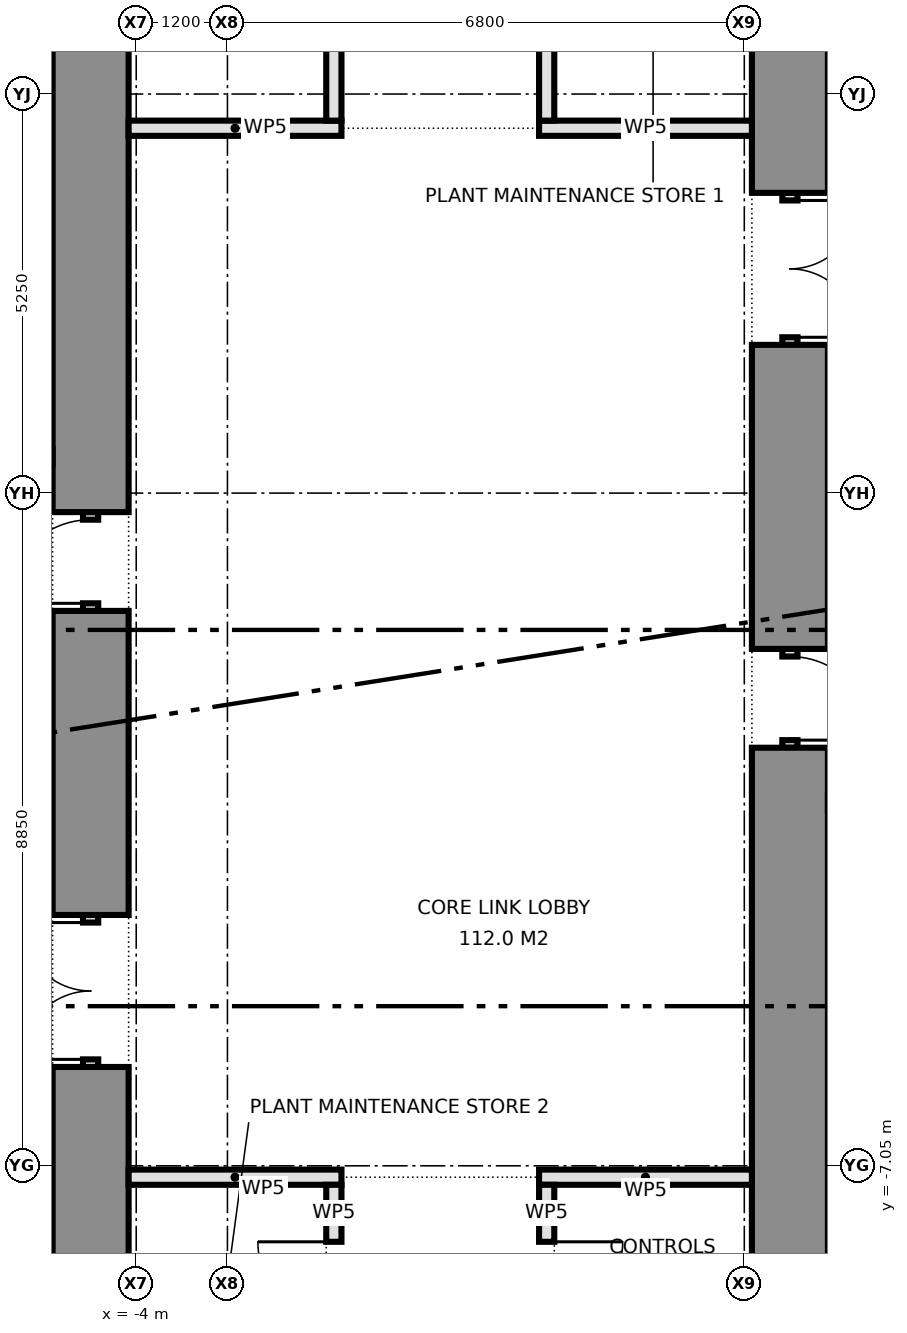
"""IFC4 building model, lengths in metres.
Left out: names, types, materials, properties, quantities, classifications, styles, units other than length and angle.
Written with IfcOpenShell. Run it as: python <this file> out.ifc"""

import sys

from ifc_helpers import new_model, si_unit, direction, frame, frame_2d, origin, place, context, subcontext, project, spatial, rectangle, extrude, element, fill, save


model = new_model("IFC4")
c1 = context("Model", 3, precision=1e-05, world=origin(), true_north=direction((0.0, 1.0)))
c2 = subcontext(c1, "Body", "Model", "MODEL_VIEW")
j1 = project(units=[si_unit("LENGTHUNIT", "METRE"), si_unit("PLANEANGLEUNIT", "RADIAN")], contexts=[c1])
p1 = place(None, origin())
s1 = spatial("IfcSite", under=j1, at=p1, CompositionType="ELEMENT")
p2 = place(p1, origin())
s2 = spatial("IfcBuilding", under=s1, at=p2, CompositionType="ELEMENT")
p3 = place(p2, frame((0.0, 0.0, 120.4)))
s3 = spatial("IfcBuildingStorey", under=s2, at=p3, CompositionType="ELEMENT", Elevation=120.4)
p4 = place(p3, frame((-4.6, -8.9, 0.0), z_axis=(0.0, 0.0, 1.0), x_axis=(0.0, 1.0, 0.0)))
e1 = element("IfcWall", 1, at=p4, inside=s3, PredefinedType="SHEAR", context=c2, shape_type="SweptSolid", body=[
    extrude(rectangle(XDim=3.15, YDim=1.0, at=frame_2d((1.575, 0.0))), origin(), (0.0, 0.0, 1.0), 4.34),
])
p5 = place(p3, frame((-4.6, -5.75, 0.0), z_axis=(0.0, 0.0, 1.0), x_axis=(0.0, 1.0, 0.0)))
e2 = element("IfcWall", 2, at=p5, inside=s3, PredefinedType="PARTITIONING", context=c2, shape_type="SweptSolid", body=[
    extrude(rectangle(XDim=2.0, YDim=0.2, at=frame_2d((1.0, 0.0))), origin(), (0.0, 0.0, 1.0), 2.4),
])
p6 = place(p5, frame((0.1, 0.0, 0.0)))
e3 = element("IfcOpeningElement", 3, at=p6, cuts=e2, PredefinedType="OPENING", context=c2, shape_type="SweptSolid", body=[
    extrude(rectangle(XDim=1.8, YDim=2.1, at=frame_2d((0.9, 1.05))), frame((0.0, 0.11, 0.0), z_axis=(0.0, -1.0, 0.0), x_axis=(1.0, 0.0, 0.0)), (0.0, 0.0, 1.0), 0.22),
])
p7 = place(p3, frame((-4.6, -3.75, 0.0), z_axis=(0.0, 0.0, 1.0), x_axis=(0.0, 1.0, 0.0)))
e4 = element("IfcWall", 4, at=p7, inside=s3, PredefinedType="SHEAR", context=c2, shape_type="SweptSolid", body=[
    extrude(rectangle(XDim=4.0, YDim=1.0, at=frame_2d((2.0, 0.0))), origin(), (0.0, 0.0, 1.0), 4.34),
])
p8 = place(p3, frame((-4.6, 0.25, 0.0), z_axis=(0.0, 0.0, 1.0), x_axis=(0.0, 1.0, 0.0)))
e5 = element("IfcWall", 5, at=p8, inside=s3, PredefinedType="PARTITIONING", context=c2, shape_type="SweptSolid", body=[
    extrude(rectangle(XDim=1.3, YDim=0.2, at=frame_2d((0.65, 0.0))), origin(), (0.0, 0.0, 1.0), 2.4),
])
p9 = place(p8, frame((0.1, 0.0, 0.0)))
e6 = element("IfcOpeningElement", 6, at=p9, cuts=e5, PredefinedType="OPENING", context=c2, shape_type="SweptSolid", body=[
    extrude(rectangle(XDim=1.1, YDim=2.1, at=frame_2d((0.55, 1.05))), frame((0.0, 0.11, 0.0), z_axis=(0.0, -1.0, 0.0), x_axis=(1.0, 0.0, 0.0)), (0.0, 0.0, 1.0), 0.22),
])
p10 = place(p3, frame((-4.6, 1.55, 0.0), z_axis=(0.0, 0.0, 1.0), x_axis=(0.0, 1.0, 0.0)))
e7 = element("IfcWall", 7, at=p10, inside=s3, PredefinedType="SHEAR", context=c2, shape_type="SweptSolid", body=[
    extrude(rectangle(XDim=7.35, YDim=1.0, at=frame_2d((3.675, 0.0))), origin(), (0.0, 0.0, 1.0), 4.34),
])
p11 = place(p3, frame((4.6, 8.9, 0.0), z_axis=(0.0, 0.0, 1.0), x_axis=(0.0, -1.0, 0.0)))
e8 = element("IfcWall", 8, at=p11, inside=s3, PredefinedType="SHEAR", context=c2, shape_type="SweptSolid", body=[
    extrude(rectangle(XDim=3.15, YDim=1.0, at=frame_2d((1.575, 0.0))), origin(), (0.0, 0.0, 1.0), 4.34),
])
p12 = place(p3, frame((4.6, 5.75, 0.0), z_axis=(0.0, 0.0, 1.0), x_axis=(0.0, -1.0, 0.0)))
e9 = element("IfcWall", 9, at=p12, inside=s3, PredefinedType="PARTITIONING", context=c2, shape_type="SweptSolid", body=[
    extrude(rectangle(XDim=2.0, YDim=0.2, at=frame_2d((1.0, 0.0))), origin(), (0.0, 0.0, 1.0), 2.4),
])
p13 = place(p12, frame((0.1, 0.0, 0.0)))
e10 = element("IfcOpeningElement", 10, at=p13, cuts=e9, PredefinedType="OPENING", context=c2, shape_type="SweptSolid", body=[
    extrude(rectangle(XDim=1.8, YDim=2.1, at=frame_2d((0.9, 1.05))), frame((0.0, 0.11, 0.0), z_axis=(0.0, -1.0, 0.0), x_axis=(1.0, 0.0, 0.0)), (0.0, 0.0, 1.0), 0.22),
])
p14 = place(p3, frame((4.6, 3.75, 0.0), z_axis=(0.0, 0.0, 1.0), x_axis=(0.0, -1.0, 0.0)))
e11 = element("IfcWall", 11, at=p14, inside=s3, PredefinedType="SHEAR", context=c2, shape_type="SweptSolid", body=[
    extrude(rectangle(XDim=4.0, YDim=1.0, at=frame_2d((2.0, 0.0))), origin(), (0.0, 0.0, 1.0), 4.34),
])
p15 = place(p3, frame((4.6, -0.25, 0.0), z_axis=(0.0, 0.0, 1.0), x_axis=(0.0, -1.0, 0.0)))
e12 = element("IfcWall", 12, at=p15, inside=s3, PredefinedType="PARTITIONING", context=c2, shape_type="SweptSolid", body=[
    extrude(rectangle(XDim=1.3, YDim=0.2, at=frame_2d((0.65, 0.0))), origin(), (0.0, 0.0, 1.0), 2.4),
])
p16 = place(p15, frame((0.1, 0.0, 0.0)))
e13 = element("IfcOpeningElement", 13, at=p16, cuts=e12, PredefinedType="OPENING", context=c2, shape_type="SweptSolid", body=[
    extrude(rectangle(XDim=1.1, YDim=2.1, at=frame_2d((0.55, 1.05))), frame((0.0, 0.11, 0.0), z_axis=(0.0, -1.0, 0.0), x_axis=(1.0, 0.0, 0.0)), (0.0, 0.0, 1.0), 0.22),
])
p17 = place(p3, frame((4.6, -1.55, 0.0), z_axis=(0.0, 0.0, 1.0), x_axis=(0.0, -1.0, 0.0)))
e14 = element("IfcWall", 14, at=p17, inside=s3, PredefinedType="SHEAR", context=c2, shape_type="SweptSolid", body=[
    extrude(rectangle(XDim=7.35, YDim=1.0, at=frame_2d((3.675, 0.0))), origin(), (0.0, 0.0, 1.0), 4.34),
])
for number, where, z_axis, x_axis in (
    (15, (-4.1, -7.2, 0.0), (0.0, 0.0, 1.0), (1.0, 0.0, 0.0)),
    (16, (1.3, -7.2, 0.0), (0.0, 0.0, 1.0), (1.0, 0.0, 0.0)),
    (17, (-4.1, 6.6, 0.0), (0.0, 0.0, 1.0), (1.0, 0.0, 0.0)),
    (18, (1.3, 6.6, 0.0), (0.0, 0.0, 1.0), (1.0, 0.0, 0.0)),
):
    element("IfcWall", number, at=place(p3, frame(where, z_axis=z_axis, x_axis=x_axis)), inside=s3, PredefinedType="PARTITIONING", context=c2, shape_type="SweptSolid", body=[
        extrude(rectangle(XDim=2.8, YDim=0.2, at=frame_2d((1.4, 0.0))), origin(), (0.0, 0.0, 1.0), 4.34),
    ])
p18 = place(p3, frame((1.4, -9.8, 0.0), z_axis=(0.0, 0.0, 1.0), x_axis=(0.0, 1.0, 0.0)))
e19 = element("IfcWall", 19, at=p18, inside=s3, PredefinedType="PARTITIONING", context=c2, shape_type="SweptSolid", body=[
    extrude(rectangle(XDim=2.5, YDim=0.2, at=frame_2d((1.25, 0.0))), origin(), (0.0, 0.0, 1.0), 4.34),
])
p19 = place(p18, frame((0.75, 0.0, 0.0)))
e20 = element("IfcOpeningElement", 20, at=p19, cuts=e19, PredefinedType="OPENING", context=c2, shape_type="SweptSolid", body=[
    extrude(rectangle(XDim=1.0, YDim=2.1, at=frame_2d((0.5, 1.05))), frame((0.0, 0.11, 0.0), z_axis=(0.0, -1.0, 0.0), x_axis=(1.0, 0.0, 0.0)), (0.0, 0.0, 1.0), 0.22),
])
p20 = place(p3, frame((1.4, 6.7, 0.0), z_axis=(0.0, 0.0, 1.0), x_axis=(0.0, 1.0, 0.0)))
e21 = element("IfcWall", 21, at=p20, inside=s3, PredefinedType="PARTITIONING", context=c2, shape_type="SweptSolid", body=[
    extrude(rectangle(XDim=3.1, YDim=0.2, at=frame_2d((1.55, 0.0))), origin(), (0.0, 0.0, 1.0), 4.34),
])
p21 = place(p20, frame((1.05, 0.0, 0.0)))
e22 = element("IfcOpeningElement", 22, at=p21, cuts=e21, PredefinedType="OPENING", context=c2, shape_type="SweptSolid", body=[
    extrude(rectangle(XDim=1.0, YDim=2.1, at=frame_2d((0.5, 1.05))), frame((0.0, 0.11, 0.0), z_axis=(0.0, -1.0, 0.0), x_axis=(1.0, 0.0, 0.0)), (0.0, 0.0, 1.0), 0.22),
])
p22 = place(p3, frame((-1.4, -9.8, 0.0), z_axis=(0.0, 0.0, 1.0), x_axis=(0.0, 1.0, 0.0)))
e23 = element("IfcWall", 23, at=p22, inside=s3, PredefinedType="PARTITIONING", context=c2, shape_type="SweptSolid", body=[
    extrude(rectangle(XDim=2.5, YDim=0.2, at=frame_2d((1.25, 0.0))), origin(), (0.0, 0.0, 1.0), 4.34),
])
p23 = place(p22, frame((0.75, 0.0, 0.0)))
e24 = element("IfcOpeningElement", 24, at=p23, cuts=e23, PredefinedType="OPENING", context=c2, shape_type="SweptSolid", body=[
    extrude(rectangle(XDim=1.0, YDim=2.1, at=frame_2d((0.5, 1.05))), frame((0.0, 0.11, 0.0), z_axis=(0.0, -1.0, 0.0), x_axis=(1.0, 0.0, 0.0)), (0.0, 0.0, 1.0), 0.22),
])
p24 = place(p3, frame((-1.4, 6.7, 0.0), z_axis=(0.0, 0.0, 1.0), x_axis=(0.0, 1.0, 0.0)))
e25 = element("IfcWall", 25, at=p24, inside=s3, PredefinedType="PARTITIONING", context=c2, shape_type="SweptSolid", body=[
    extrude(rectangle(XDim=3.1, YDim=0.2, at=frame_2d((1.55, 0.0))), origin(), (0.0, 0.0, 1.0), 4.34),
])
p25 = place(p24, frame((1.05, 0.0, 0.0)))
e26 = element("IfcOpeningElement", 26, at=p25, cuts=e25, PredefinedType="OPENING", context=c2, shape_type="SweptSolid", body=[
    extrude(rectangle(XDim=1.0, YDim=2.1, at=frame_2d((0.5, 1.05))), frame((0.0, 0.11, 0.0), z_axis=(0.0, -1.0, 0.0), x_axis=(1.0, 0.0, 0.0)), (0.0, 0.0, 1.0), 0.22),
])
p26 = place(p6, origin())
e27 = element("IfcDoor", 27, at=p26, inside=s3, OperationType="DOUBLE_DOOR_SINGLE_SWING", PredefinedType="DOOR", context=c2, shape_type="SweptSolid", body=[
    extrude(rectangle(XDim=1.8, YDim=2.1, at=frame_2d((0.9, 1.05))), frame((0.0, 0.025, 0.0), z_axis=(0.0, -1.0, 0.0), x_axis=(1.0, 0.0, 0.0)), (0.0, 0.0, 1.0), 0.05),
])
fill(e3, e27)
p27 = place(p9, origin())
e28 = element("IfcDoor", 28, at=p27, inside=s3, OperationType="SINGLE_SWING_LEFT", PredefinedType="DOOR", context=c2, shape_type="SweptSolid", body=[
    extrude(rectangle(XDim=1.1, YDim=2.1, at=frame_2d((0.55, 1.05))), frame((0.0, 0.025, 0.0), z_axis=(0.0, -1.0, 0.0), x_axis=(1.0, 0.0, 0.0)), (0.0, 0.0, 1.0), 0.05),
])
fill(e6, e28)
p28 = place(p13, origin())
e29 = element("IfcDoor", 29, at=p28, inside=s3, OperationType="DOUBLE_DOOR_SINGLE_SWING", PredefinedType="DOOR", context=c2, shape_type="SweptSolid", body=[
    extrude(rectangle(XDim=1.8, YDim=2.1, at=frame_2d((0.9, 1.05))), frame((0.0, 0.025, 0.0), z_axis=(0.0, -1.0, 0.0), x_axis=(1.0, 0.0, 0.0)), (0.0, 0.0, 1.0), 0.05),
])
fill(e10, e29)
p29 = place(p16, origin())
e30 = element("IfcDoor", 30, at=p29, inside=s3, OperationType="SINGLE_SWING_RIGHT", PredefinedType="DOOR", context=c2, shape_type="SweptSolid", body=[
    extrude(rectangle(XDim=1.1, YDim=2.1, at=frame_2d((0.55, 1.05))), frame((0.0, 0.025, 0.0), z_axis=(0.0, -1.0, 0.0), x_axis=(1.0, 0.0, 0.0)), (0.0, 0.0, 1.0), 0.05),
])
fill(e13, e30)
p30 = place(p23, origin())
e31 = element("IfcDoor", 31, at=p30, inside=s3, OperationType="SINGLE_SWING_RIGHT", PredefinedType="DOOR", context=c2, shape_type="SweptSolid", body=[
    extrude(rectangle(XDim=1.0, YDim=2.1, at=frame_2d((0.5, 1.05))), frame((0.0, 0.025, 0.0), z_axis=(0.0, -1.0, 0.0), x_axis=(1.0, 0.0, 0.0)), (0.0, 0.0, 1.0), 0.05),
])
fill(e24, e31)
p31 = place(p19, frame((1.0, 0.0, 0.0), z_axis=(0.0, 0.0, 1.0), x_axis=(-1.0, 0.0, 0.0)))
e32 = element("IfcDoor", 32, at=p31, inside=s3, OperationType="SINGLE_SWING_LEFT", PredefinedType="DOOR", context=c2, shape_type="SweptSolid", body=[
    extrude(rectangle(XDim=1.0, YDim=2.1, at=frame_2d((0.5, 1.05))), frame((0.0, 0.025, 0.0), z_axis=(0.0, -1.0, 0.0), x_axis=(1.0, 0.0, 0.0)), (0.0, 0.0, 1.0), 0.05),
])
fill(e20, e32)
save(model, sys.argv[1])
